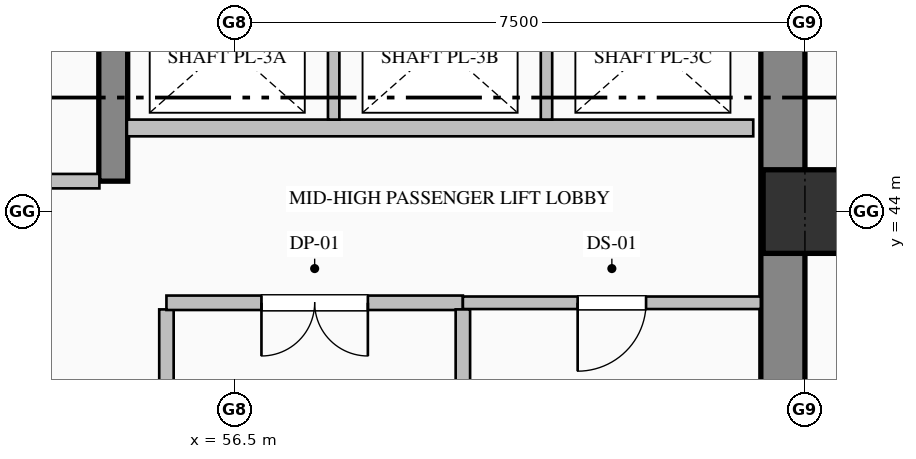
"""IFC4 building model, lengths in metres.
Left out: names, types, materials, properties, quantities, classifications, styles, units other than length and angle.
Written with IfcOpenShell. Run it as: python <this file> out.ifc"""

import sys

from ifc_helpers import new_model, si_unit, direction, frame, frame_2d, origin, origin_2d, place, context, subcontext, project, spatial, rectangle, extrude, element, fill, save


model = new_model("IFC4")
c1 = context("Model", 3, precision=1e-05, world=origin(), true_north=direction((0.0, 1.0)))
c2 = subcontext(c1, "Body", "Model", "MODEL_VIEW")
j1 = project(units=[si_unit("LENGTHUNIT", "METRE"), si_unit("PLANEANGLEUNIT", "RADIAN")], contexts=[c1])
p1 = place(None, origin())
s1 = spatial("IfcSite", under=j1, at=p1, CompositionType="ELEMENT")
p2 = place(p1, origin())
s2 = spatial("IfcBuilding", under=s1, at=p2, CompositionType="ELEMENT")
p3 = place(p2, frame((0.0, 0.0, 17.4)))
s3 = spatial("IfcBuildingStorey", under=s2, at=p3, CompositionType="ELEMENT", Elevation=17.4)
p4 = place(p3, frame((63.71, 36.32, 0.0), z_axis=(0.0, 0.0, 1.0), x_axis=(0.0, 1.0, 0.0)))
e1 = element("IfcWall", 1, at=p4, inside=s3, PredefinedType="SHEAR", context=c2, shape_type="SweptSolid", body=[
    extrude(rectangle(XDim=15.1, YDim=0.58, at=frame_2d((7.55, 0.0))), origin(), (0.0, 0.0, 1.0), 5.14),
])
p5 = place(p3, frame((54.9, 44.4, 0.0), z_axis=(0.0, 0.0, 1.0), x_axis=(0.0, 1.0, 0.0)))
e2 = element("IfcWall", 2, at=p5, inside=s3, PredefinedType="SHEAR", context=c2, shape_type="SweptSolid", body=[
    extrude(rectangle(XDim=7.02, YDim=0.38, at=frame_2d((3.51, 0.0))), origin(), (0.0, 0.0, 1.0), 5.14),
])
p6 = place(p3, frame((64.0, 44.0, 0.0), z_axis=(0.0, 0.0, 1.0), x_axis=(1.0, 0.0, 0.0)))
e3 = element("IfcColumn", 3, at=p6, inside=s3, PredefinedType="COLUMN", context=c2, shape_type="SweptSolid", body=[
    extrude(rectangle(XDim=1.1, YDim=1.1, at=origin_2d()), origin(), (0.0, 0.0, 1.0), 5.4),
])
p7 = place(p3, frame((63.32, 45.1, 0.0), z_axis=(0.0, 0.0, 1.0), x_axis=(-1.0, 0.0, 0.0)))
e4 = element("IfcWall", 4, at=p7, inside=s3, PredefinedType="PARTITIONING", context=c2, shape_type="SweptSolid", body=[
    extrude(rectangle(XDim=8.24, YDim=0.22, at=frame_2d((4.12, 0.0))), origin(), (0.0, 0.0, 1.0), 5.14),
])
for number, where, z_axis, x_axis in (
    (5, (57.8, 45.21, 0.0), (0.0, 0.0, 1.0), (0.0, 1.0, 0.0)),
    (6, (60.6, 45.21, 0.0), (0.0, 0.0, 1.0), (0.0, 1.0, 0.0)),
):
    element("IfcWall", number, at=place(p3, frame(where, z_axis=z_axis, x_axis=x_axis)), inside=s3, PredefinedType="PARTITIONING", context=c2, shape_type="SweptSolid", body=[
        extrude(rectangle(XDim=2.03, YDim=0.15, at=frame_2d((1.015, 0.0))), origin(), (0.0, 0.0, 1.0), 5.14),
    ])
p8 = place(p3, frame((54.718, 44.4, 0.0), z_axis=(0.0, 0.0, 1.0), x_axis=(-1.0, 0.0, 0.0)))
e7 = element("IfcWall", 7, at=p8, inside=s3, PredefinedType="PARTITIONING", context=c2, shape_type="SweptSolid", body=[
    extrude(rectangle(XDim=5.136, YDim=0.19, at=frame_2d((2.568, 0.0))), origin(), (0.0, 0.0, 1.0), 5.14),
])
p9 = place(p8, frame((2.043, 0.0, 0.0)))
e8 = element("IfcOpeningElement", 8, at=p9, cuts=e7, PredefinedType="OPENING", context=c2, shape_type="SweptSolid", body=[
    extrude(rectangle(XDim=1.05, YDim=2.15, at=frame_2d((0.525, 1.075))), frame((0.0, 0.105, 0.0), z_axis=(0.0, -1.0, 0.0), x_axis=(1.0, 0.0, 0.0)), (0.0, 0.0, 1.0), 0.21),
])
p10 = place(p3, frame((55.6, 42.713, 0.0), z_axis=(0.0, 0.0, 1.0), x_axis=(0.0, -1.0, 0.0)))
e9 = element("IfcWall", 9, at=p10, inside=s3, PredefinedType="PARTITIONING", context=c2, shape_type="SweptSolid", body=[
    extrude(rectangle(XDim=2.731, YDim=0.19, at=frame_2d((1.365, 0.0))), origin(), (0.0, 0.0, 1.0), 5.14),
])
p11 = place(p3, frame((59.5, 42.8, 0.0), z_axis=(0.0, 0.0, 1.0), x_axis=(-1.0, 0.0, 0.0)))
e10 = element("IfcWall", 10, at=p11, inside=s3, PredefinedType="PARTITIONING", context=c2, shape_type="SweptSolid", body=[
    extrude(rectangle(XDim=3.9, YDim=0.19, at=frame_2d((1.95, 0.0))), origin(), (0.0, 0.0, 1.0), 5.14),
])
p12 = place(p11, frame((1.25, 0.0, 0.0)))
e11 = element("IfcOpeningElement", 11, at=p12, cuts=e10, PredefinedType="OPENING", context=c2, shape_type="SweptSolid", body=[
    extrude(rectangle(XDim=1.4, YDim=2.25, at=frame_2d((0.7, 1.125))), frame((0.0, 0.105, 0.0), z_axis=(0.0, -1.0, 0.0), x_axis=(1.0, 0.0, 0.0)), (0.0, 0.0, 1.0), 0.21),
])
p13 = place(p3, frame((63.42, 42.8, 0.0), z_axis=(0.0, 0.0, 1.0), x_axis=(-1.0, 0.0, 0.0)))
e12 = element("IfcWall", 12, at=p13, inside=s3, PredefinedType="PARTITIONING", context=c2, shape_type="SweptSolid", body=[
    extrude(rectangle(XDim=3.92, YDim=0.165, at=frame_2d((1.96, 0.0))), origin(), (0.0, 0.0, 1.0), 5.14),
])
p14 = place(p13, frame((1.51, 0.0, 0.0)))
e13 = element("IfcOpeningElement", 13, at=p14, cuts=e12, PredefinedType="OPENING", context=c2, shape_type="SweptSolid", body=[
    extrude(rectangle(XDim=0.9, YDim=2.15, at=frame_2d((0.45, 1.075))), frame((0.0, 0.093, 0.0), z_axis=(0.0, -1.0, 0.0), x_axis=(1.0, 0.0, 0.0)), (0.0, 0.0, 1.0), 0.185),
])
p15 = place(p3, frame((59.5, 42.713, 0.0), z_axis=(0.0, 0.0, 1.0), x_axis=(0.0, -1.0, 0.0)))
e14 = element("IfcWall", 14, at=p15, inside=s3, PredefinedType="PARTITIONING", context=c2, shape_type="SweptSolid", body=[
    extrude(rectangle(XDim=2.731, YDim=0.19, at=frame_2d((1.365, 0.0))), origin(), (0.0, 0.0, 1.0), 5.14),
])
p16 = place(p12, origin())
e15 = element("IfcDoor", 15, at=p16, inside=s3, OperationType="DOUBLE_DOOR_SINGLE_SWING", PredefinedType="DOOR", context=c2, shape_type="SweptSolid", body=[
    extrude(rectangle(XDim=1.4, YDim=2.25, at=frame_2d((0.7, 1.125))), frame((0.0, 0.025, 0.0), z_axis=(0.0, -1.0, 0.0), x_axis=(1.0, 0.0, 0.0)), (0.0, 0.0, 1.0), 0.05),
])
fill(e11, e15)
p17 = place(p14, origin())
e16 = element("IfcDoor", 16, at=p17, inside=s3, OperationType="SINGLE_SWING_RIGHT", PredefinedType="DOOR", context=c2, shape_type="SweptSolid", body=[
    extrude(rectangle(XDim=0.9, YDim=2.15, at=frame_2d((0.45, 1.075))), frame((0.0, 0.025, 0.0), z_axis=(0.0, -1.0, 0.0), x_axis=(1.0, 0.0, 0.0)), (0.0, 0.0, 1.0), 0.05),
])
fill(e13, e16)
save(model, sys.argv[1])
